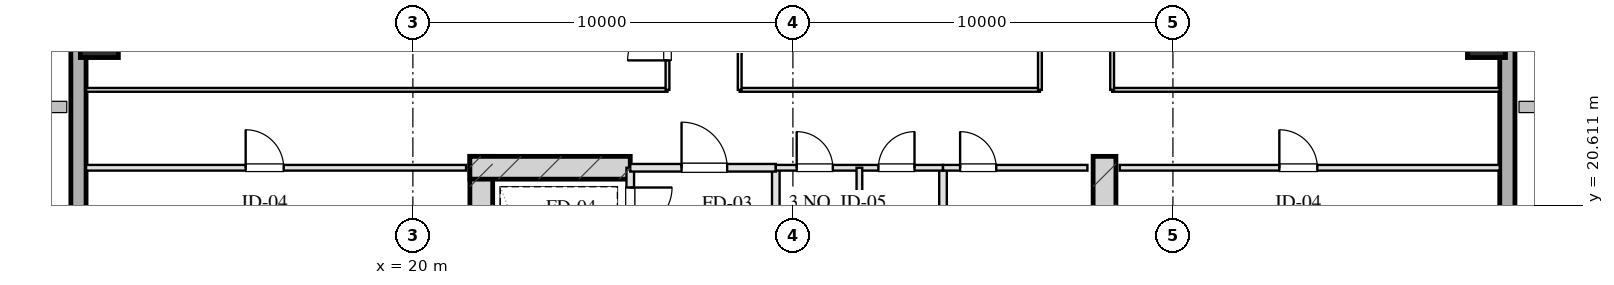
"""IFC4 building model, lengths in metres.
Left out: names, types, materials, properties, quantities, classifications, styles, units other than length and angle.
Written with IfcOpenShell. Run it as: python <this file> out.ifc"""

import sys

from ifc_helpers import new_model, si_unit, direction, frame, frame_2d, origin, origin_2d, place, context, subcontext, project, spatial, rectangle, hollow_rectangle, extrude, element, fill, save


model = new_model("IFC4")
c1 = context("Model", 3, precision=1e-05, world=origin(), true_north=direction((0.0, 1.0)))
c2 = subcontext(c1, "Body", "Model", "MODEL_VIEW")
j1 = project(units=[si_unit("LENGTHUNIT", "METRE"), si_unit("PLANEANGLEUNIT", "RADIAN")], contexts=[c1])
p1 = place(None, origin())
s1 = spatial("IfcSite", under=j1, at=p1, CompositionType="ELEMENT")
p2 = place(p1, origin())
s2 = spatial("IfcBuilding", under=s1, at=p2, CompositionType="ELEMENT")
p3 = place(p2, frame((0.0, 0.0, 110.4)))
s3 = spatial("IfcBuildingStorey", under=s2, at=p3, CompositionType="ELEMENT", Elevation=110.4)
for number, where, z_axis, x_axis in (
    (1, (21.8, 21.9, 0.0), (0.0, 0.0, 1.0), (0.0, -1.0, 0.0)),
    (2, (38.2, 21.9, 0.0), (0.0, 0.0, 1.0), (0.0, -1.0, 0.0)),
):
    element("IfcWall", number, at=place(p3, frame(where, z_axis=z_axis, x_axis=x_axis)), inside=s3, PredefinedType="SHEAR", context=c2, shape_type="SweptSolid", body=[
        extrude(rectangle(XDim=9.48, YDim=0.6, at=frame_2d((4.74, 0.0))), origin(), (0.0, 0.0, 1.0), 3.45),
    ])
p4 = place(p3, frame((21.5, 21.6, 0.0), z_axis=(0.0, 0.0, 1.0), x_axis=(1.0, 0.0, 0.0)))
e3 = element("IfcWall", 3, at=p4, inside=s3, PredefinedType="SHEAR", context=c2, shape_type="SweptSolid", body=[
    extrude(rectangle(XDim=4.22, YDim=0.6, at=frame_2d((2.11, 0.0))), origin(), (0.0, 0.0, 1.0), 3.45),
])
for number, where, z_axis, x_axis in (
    (4, (11.75, 25.0, 0.0), (0.0, 0.0, 1.0), (1.0, 0.0, 0.0)),
    (5, (48.25, 25.0, 0.0), (0.0, 0.0, 1.0), (1.0, 0.0, 0.0)),
):
    element("IfcColumn", number, at=place(p3, frame(where, z_axis=z_axis, x_axis=x_axis)), inside=s3, PredefinedType="COLUMN", context=c2, shape_type="SweptSolid", body=[
        extrude(hollow_rectangle(XDim=1.0, YDim=1.0, WallThickness=0.036, at=origin_2d()), origin(), (0.0, 0.0, 1.0), 3.451),
    ])
p5 = place(p3, frame((11.2, 9.0, 0.0), z_axis=(0.0, 0.0, 1.0), x_axis=(0.0, 1.0, 0.0)))
e6 = element("IfcWall", 6, at=p5, inside=s3, PredefinedType="SOLIDWALL", context=c2, shape_type="SweptSolid", body=[
    extrude(rectangle(XDim=50.0, YDim=0.4, at=frame_2d((25.0, 0.0))), origin(), (0.0, 0.0, 1.0), 2.61),
])
p6 = place(p5, frame((26.4, 0.0, 0.75)))
e7 = element("IfcOpeningElement", 7, at=p6, cuts=e6, PredefinedType="OPENING", context=c2, shape_type="SweptSolid", body=[
    extrude(rectangle(XDim=2.4, YDim=1.46, at=frame_2d((1.2, 0.73))), frame((0.0, 0.21, 0.0), z_axis=(0.0, -1.0, 0.0), x_axis=(1.0, 0.0, 0.0)), (0.0, 0.0, 1.0), 0.42),
])
p7 = place(p5, frame((18.65, 0.0, 0.0)))
e8 = element("IfcOpeningElement", 8, at=p7, cuts=e6, PredefinedType="OPENING", context=c2, shape_type="SweptSolid", body=[
    extrude(rectangle(XDim=1.1, YDim=2.15, at=frame_2d((0.55, 1.075))), frame((0.0, 0.21, 0.0), z_axis=(0.0, -1.0, 0.0), x_axis=(1.0, 0.0, 0.0)), (0.0, 0.0, 1.0), 0.42),
])
p8 = place(p3, frame((48.8, 59.0, 0.0), z_axis=(0.0, 0.0, 1.0), x_axis=(0.0, -1.0, 0.0)))
e9 = element("IfcWall", 9, at=p8, inside=s3, PredefinedType="SOLIDWALL", context=c2, shape_type="SweptSolid", body=[
    extrude(rectangle(XDim=50.0, YDim=0.4, at=frame_2d((25.0, 0.0))), origin(), (0.0, 0.0, 1.0), 2.61),
])
p9 = place(p8, frame((17.4, 0.0, 0.75)))
e10 = element("IfcOpeningElement", 10, at=p9, cuts=e9, PredefinedType="OPENING", context=c2, shape_type="SweptSolid", body=[
    extrude(rectangle(XDim=2.4, YDim=1.46, at=frame_2d((1.2, 0.73))), frame((0.0, 0.21, 0.0), z_axis=(0.0, -1.0, 0.0), x_axis=(1.0, 0.0, 0.0)), (0.0, 0.0, 1.0), 0.42),
])
p10 = place(p8, frame((30.226, 0.0, 0.0)))
e11 = element("IfcOpeningElement", 11, at=p10, cuts=e9, PredefinedType="OPENING", context=c2, shape_type="SweptSolid", body=[
    extrude(rectangle(XDim=1.1, YDim=2.15, at=frame_2d((0.55, 1.075))), frame((0.0, 0.21, 0.0), z_axis=(0.0, -1.0, 0.0), x_axis=(1.0, 0.0, 0.0)), (0.0, 0.0, 1.0), 0.42),
])
p11 = place(p3, frame((25.72, 21.6, 0.0), z_axis=(0.0, 0.0, 1.0), x_axis=(0.0, -1.0, 0.0)))
e12 = element("IfcWall", 12, at=p11, inside=s3, PredefinedType="PARTITIONING", context=c2, shape_type="SweptSolid", body=[
    extrude(rectangle(XDim=1.9, YDim=0.2, at=frame_2d((0.95, 0.0))), origin(), (0.0, 0.0, 1.0), 3.175),
])
p12 = place(p11, frame((0.52, 0.0, 0.0)))
e13 = element("IfcOpeningElement", 13, at=p12, cuts=e12, PredefinedType="OPENING", context=c2, shape_type="SweptSolid", body=[
    extrude(rectangle(XDim=1.1, YDim=2.05, at=frame_2d((0.55, 1.025))), frame((0.0, 0.11, 0.0), z_axis=(0.0, -1.0, 0.0), x_axis=(1.0, 0.0, 0.0)), (0.0, 0.0, 1.0), 0.22),
])
p13 = place(p3, frame((29.55, 21.6, 0.0), z_axis=(0.0, 0.0, 1.0), x_axis=(0.0, -1.0, 0.0)))
e14 = element("IfcWall", 14, at=p13, inside=s3, PredefinedType="PARTITIONING", context=c2, shape_type="SweptSolid", body=[
    extrude(rectangle(XDim=8.43, YDim=0.2, at=frame_2d((4.215, 0.0))), origin(), (0.0, 0.0, 1.0), 3.175),
])
p14 = place(p3, frame((25.72, 21.6, 0.0), z_axis=(0.0, 0.0, 1.0), x_axis=(1.0, 0.0, 0.0)))
e15 = element("IfcWall", 15, at=p14, inside=s3, PredefinedType="PARTITIONING", context=c2, shape_type="SweptSolid", body=[
    extrude(rectangle(XDim=3.83, YDim=0.2, at=frame_2d((1.915, 0.0))), origin(), (0.0, 0.0, 1.0), 3.175),
])
p15 = place(p14, frame((1.35, 0.0, 0.0)))
e16 = element("IfcOpeningElement", 16, at=p15, cuts=e15, PredefinedType="OPENING", context=c2, shape_type="SweptSolid", body=[
    extrude(rectangle(XDim=1.2, YDim=2.05, at=frame_2d((0.6, 1.025))), frame((0.0, 0.11, 0.0), z_axis=(0.0, -1.0, 0.0), x_axis=(1.0, 0.0, 0.0)), (0.0, 0.0, 1.0), 0.22),
])
p16 = place(p3, frame((33.95, 21.6, 0.0), z_axis=(0.0, 0.0, 1.0), x_axis=(0.0, -1.0, 0.0)))
e17 = element("IfcWall", 17, at=p16, inside=s3, PredefinedType="PARTITIONING", context=c2, shape_type="SweptSolid", body=[
    extrude(rectangle(XDim=8.43, YDim=0.2, at=frame_2d((4.215, 0.0))), origin(), (0.0, 0.0, 1.0), 3.175),
])
p17 = place(p3, frame((29.55, 21.6, 0.0), z_axis=(0.0, 0.0, 1.0), x_axis=(1.0, 0.0, 0.0)))
e18 = element("IfcWall", 18, at=p17, inside=s3, PredefinedType="PARTITIONING", context=c2, shape_type="SweptSolid", body=[
    extrude(rectangle(XDim=4.4, YDim=0.15, at=frame_2d((2.2, 0.0))), origin(), (0.0, 0.0, 1.0), 3.175),
])
p18 = place(p17, frame((0.55, 0.0, 0.0)))
e19 = element("IfcOpeningElement", 19, at=p18, cuts=e18, PredefinedType="OPENING", context=c2, shape_type="SweptSolid", body=[
    extrude(rectangle(XDim=0.95, YDim=2.05, at=frame_2d((0.475, 1.025))), frame((0.0, 0.085, 0.0), z_axis=(0.0, -1.0, 0.0), x_axis=(1.0, 0.0, 0.0)), (0.0, 0.0, 1.0), 0.17),
])
p19 = place(p17, frame((2.7, 0.0, 0.0)))
e20 = element("IfcOpeningElement", 20, at=p19, cuts=e18, PredefinedType="OPENING", context=c2, shape_type="SweptSolid", body=[
    extrude(rectangle(XDim=0.95, YDim=2.05, at=frame_2d((0.475, 1.025))), frame((0.0, 0.085, 0.0), z_axis=(0.0, -1.0, 0.0), x_axis=(1.0, 0.0, 0.0)), (0.0, 0.0, 1.0), 0.17),
])
p20 = place(p3, frame((31.75, 21.6, 0.0), z_axis=(0.0, 0.0, 1.0), x_axis=(0.0, -1.0, 0.0)))
e21 = element("IfcWall", 21, at=p20, inside=s3, PredefinedType="PARTITIONING", context=c2, shape_type="SweptSolid", body=[
    extrude(rectangle(XDim=8.43, YDim=0.15, at=frame_2d((4.215, 0.0))), origin(), (0.0, 0.0, 1.0), 3.175),
])
p21 = place(p3, frame((33.95, 21.6, 0.0), z_axis=(0.0, 0.0, 1.0), x_axis=(1.0, 0.0, 0.0)))
e22 = element("IfcWall", 22, at=p21, inside=s3, PredefinedType="PARTITIONING", context=c2, shape_type="SweptSolid", body=[
    extrude(rectangle(XDim=3.8, YDim=0.15, at=frame_2d((1.9, 0.0))), origin(), (0.0, 0.0, 1.0), 3.175),
])
p22 = place(p21, frame((0.45, 0.0, 0.0)))
e23 = element("IfcOpeningElement", 23, at=p22, cuts=e22, PredefinedType="OPENING", context=c2, shape_type="SweptSolid", body=[
    extrude(rectangle(XDim=0.95, YDim=2.05, at=frame_2d((0.475, 1.025))), frame((0.0, 0.085, 0.0), z_axis=(0.0, -1.0, 0.0), x_axis=(1.0, 0.0, 0.0)), (0.0, 0.0, 1.0), 0.17),
])
p23 = place(p3, frame((11.4, 21.6, 0.0), z_axis=(0.0, 0.0, 1.0), x_axis=(1.0, 0.0, 0.0)))
e24 = element("IfcWall", 24, at=p23, inside=s3, PredefinedType="PARTITIONING", context=c2, shape_type="SweptSolid", body=[
    extrude(rectangle(XDim=10.0, YDim=0.15, at=frame_2d((5.0, 0.0))), origin(), (0.0, 0.0, 1.0), 3.175),
])
p24 = place(p23, frame((4.2, 0.0, 0.0)))
e25 = element("IfcOpeningElement", 25, at=p24, cuts=e24, PredefinedType="OPENING", context=c2, shape_type="SweptSolid", body=[
    extrude(rectangle(XDim=1.0, YDim=2.05, at=frame_2d((0.5, 1.025))), frame((0.0, 0.085, 0.0), z_axis=(0.0, -1.0, 0.0), x_axis=(1.0, 0.0, 0.0)), (0.0, 0.0, 1.0), 0.17),
])
p25 = place(p3, frame((38.6, 21.6, 0.0), z_axis=(0.0, 0.0, 1.0), x_axis=(1.0, 0.0, 0.0)))
e26 = element("IfcWall", 26, at=p25, inside=s3, PredefinedType="PARTITIONING", context=c2, shape_type="SweptSolid", body=[
    extrude(rectangle(XDim=10.0, YDim=0.15, at=frame_2d((5.0, 0.0))), origin(), (0.0, 0.0, 1.0), 3.175),
])
p26 = place(p25, frame((4.2, 0.0, 0.0)))
e27 = element("IfcOpeningElement", 27, at=p26, cuts=e26, PredefinedType="OPENING", context=c2, shape_type="SweptSolid", body=[
    extrude(rectangle(XDim=1.0, YDim=2.05, at=frame_2d((0.5, 1.025))), frame((0.0, 0.085, 0.0), z_axis=(0.0, -1.0, 0.0), x_axis=(1.0, 0.0, 0.0)), (0.0, 0.0, 1.0), 0.17),
])
p27 = place(p3, frame((11.4, 23.65, 0.0), z_axis=(0.0, 0.0, 1.0), x_axis=(1.0, 0.0, 0.0)))
e28 = element("IfcWall", 28, at=p27, inside=s3, PredefinedType="MOVABLE", context=c2, shape_type="SweptSolid", body=[
    extrude(rectangle(XDim=15.3, YDim=0.1, at=frame_2d((7.65, 0.0))), origin(), (0.0, 0.0, 1.0), 3.175),
])
p28 = place(p3, frame((28.6, 23.65, 0.0), z_axis=(0.0, 0.0, 1.0), x_axis=(1.0, 0.0, 0.0)))
e29 = element("IfcWall", 29, at=p28, inside=s3, PredefinedType="MOVABLE", context=c2, shape_type="SweptSolid", body=[
    extrude(rectangle(XDim=7.9, YDim=0.1, at=frame_2d((3.95, 0.0))), origin(), (0.0, 0.0, 1.0), 3.175),
])
p29 = place(p3, frame((38.4, 23.65, 0.0), z_axis=(0.0, 0.0, 1.0), x_axis=(1.0, 0.0, 0.0)))
e30 = element("IfcWall", 30, at=p29, inside=s3, PredefinedType="MOVABLE", context=c2, shape_type="SweptSolid", body=[
    extrude(rectangle(XDim=10.2, YDim=0.1, at=frame_2d((5.1, 0.0))), origin(), (0.0, 0.0, 1.0), 3.175),
])
p30 = place(p3, frame((26.7, 23.65, 0.0), z_axis=(0.0, 0.0, 1.0), x_axis=(0.0, 1.0, 0.0)))
e31 = element("IfcWall", 31, at=p30, inside=s3, PredefinedType="MOVABLE", context=c2, shape_type="SweptSolid", body=[
    extrude(rectangle(XDim=20.7, YDim=0.1, at=frame_2d((10.35, 0.0))), origin(), (0.0, 0.0, 1.0), 3.175),
])
p31 = place(p30, frame((0.775, 0.0, 0.0)))
e32 = element("IfcOpeningElement", 32, at=p31, cuts=e31, PredefinedType="OPENING", context=c2, shape_type="SweptSolid", body=[
    extrude(rectangle(XDim=1.05, YDim=2.05, at=frame_2d((0.525, 1.025))), frame((0.0, 0.06, 0.0), z_axis=(0.0, -1.0, 0.0), x_axis=(1.0, 0.0, 0.0)), (0.0, 0.0, 1.0), 0.12),
])
p32 = place(p30, frame((3.95, 0.0, 0.0)))
e33 = element("IfcOpeningElement", 33, at=p32, cuts=e31, PredefinedType="OPENING", context=c2, shape_type="SweptSolid", body=[
    extrude(rectangle(XDim=0.85, YDim=2.05, at=frame_2d((0.425, 1.025))), frame((0.0, 0.06, 0.0), z_axis=(0.0, -1.0, 0.0), x_axis=(1.0, 0.0, 0.0)), (0.0, 0.0, 1.0), 0.12),
])
p33 = place(p30, frame((8.273, 0.0, 0.0)))
e34 = element("IfcOpeningElement", 34, at=p33, cuts=e31, PredefinedType="OPENING", context=c2, shape_type="SweptSolid", body=[
    extrude(rectangle(XDim=1.0, YDim=2.05, at=frame_2d((0.5, 1.025))), frame((0.0, 0.06, 0.0), z_axis=(0.0, -1.0, 0.0), x_axis=(1.0, 0.0, 0.0)), (0.0, 0.0, 1.0), 0.12),
])
p34 = place(p30, frame((12.559, 0.0, 0.0)))
e35 = element("IfcOpeningElement", 35, at=p34, cuts=e31, PredefinedType="OPENING", context=c2, shape_type="SweptSolid", body=[
    extrude(rectangle(XDim=1.0, YDim=2.05, at=frame_2d((0.5, 1.025))), frame((0.0, 0.06, 0.0), z_axis=(0.0, -1.0, 0.0), x_axis=(1.0, 0.0, 0.0)), (0.0, 0.0, 1.0), 0.12),
])
p35 = place(p30, frame((16.078, 0.0, 0.0)))
e36 = element("IfcOpeningElement", 36, at=p35, cuts=e31, PredefinedType="OPENING", context=c2, shape_type="SweptSolid", body=[
    extrude(rectangle(XDim=1.0, YDim=2.05, at=frame_2d((0.5, 1.025))), frame((0.0, 0.06, 0.0), z_axis=(0.0, -1.0, 0.0), x_axis=(1.0, 0.0, 0.0)), (0.0, 0.0, 1.0), 0.12),
])
p36 = place(p30, frame((18.967, 0.0, 0.0)))
e37 = element("IfcOpeningElement", 37, at=p36, cuts=e31, PredefinedType="OPENING", context=c2, shape_type="SweptSolid", body=[
    extrude(rectangle(XDim=1.0, YDim=2.05, at=frame_2d((0.5, 1.025))), frame((0.0, 0.06, 0.0), z_axis=(0.0, -1.0, 0.0), x_axis=(1.0, 0.0, 0.0)), (0.0, 0.0, 1.0), 0.12),
])
p37 = place(p3, frame((28.6, 23.65, 0.0), z_axis=(0.0, 0.0, 1.0), x_axis=(0.0, 1.0, 0.0)))
e38 = element("IfcWall", 38, at=p37, inside=s3, PredefinedType="MOVABLE", context=c2, shape_type="SweptSolid", body=[
    extrude(rectangle(XDim=20.7, YDim=0.1, at=frame_2d((10.35, 0.0))), origin(), (0.0, 0.0, 1.0), 3.175),
])
p38 = place(p37, frame((5.198, 0.0, 0.0)))
e39 = element("IfcOpeningElement", 39, at=p38, cuts=e38, PredefinedType="OPENING", context=c2, shape_type="SweptSolid", body=[
    extrude(rectangle(XDim=1.1, YDim=2.05, at=frame_2d((0.55, 1.025))), frame((0.0, 0.06, 0.0), z_axis=(0.0, -1.0, 0.0), x_axis=(1.0, 0.0, 0.0)), (0.0, 0.0, 1.0), 0.12),
])
p39 = place(p37, frame((15.667, 0.0, 0.0)))
e40 = element("IfcOpeningElement", 40, at=p39, cuts=e38, PredefinedType="OPENING", context=c2, shape_type="SweptSolid", body=[
    extrude(rectangle(XDim=1.1, YDim=2.05, at=frame_2d((0.55, 1.025))), frame((0.0, 0.06, 0.0), z_axis=(0.0, -1.0, 0.0), x_axis=(1.0, 0.0, 0.0)), (0.0, 0.0, 1.0), 0.12),
])
p40 = place(p3, frame((36.5, 23.65, 0.0), z_axis=(0.0, 0.0, 1.0), x_axis=(0.0, 1.0, 0.0)))
e41 = element("IfcWall", 41, at=p40, inside=s3, PredefinedType="MOVABLE", context=c2, shape_type="SweptSolid", body=[
    extrude(rectangle(XDim=20.7, YDim=0.1, at=frame_2d((10.35, 0.0))), origin(), (0.0, 0.0, 1.0), 3.175),
])
p41 = place(p3, frame((38.4, 23.65, 0.0), z_axis=(0.0, 0.0, 1.0), x_axis=(0.0, 1.0, 0.0)))
e42 = element("IfcWall", 42, at=p41, inside=s3, PredefinedType="MOVABLE", context=c2, shape_type="SweptSolid", body=[
    extrude(rectangle(XDim=20.7, YDim=0.1, at=frame_2d((10.35, 0.0))), origin(), (0.0, 0.0, 1.0), 3.175),
])
p42 = place(p41, frame((2.699, 0.0, 0.0)))
e43 = element("IfcOpeningElement", 43, at=p42, cuts=e42, PredefinedType="OPENING", context=c2, shape_type="SweptSolid", body=[
    extrude(rectangle(XDim=1.0, YDim=2.05, at=frame_2d((0.5, 1.025))), frame((0.0, 0.06, 0.0), z_axis=(0.0, -1.0, 0.0), x_axis=(1.0, 0.0, 0.0)), (0.0, 0.0, 1.0), 0.12),
])
p43 = place(p41, frame((9.875, 0.0, 0.0)))
e44 = element("IfcOpeningElement", 44, at=p43, cuts=e42, PredefinedType="OPENING", context=c2, shape_type="SweptSolid", body=[
    extrude(rectangle(XDim=1.0, YDim=2.05, at=frame_2d((0.5, 1.025))), frame((0.0, 0.06, 0.0), z_axis=(0.0, -1.0, 0.0), x_axis=(1.0, 0.0, 0.0)), (0.0, 0.0, 1.0), 0.12),
])
p44 = place(p41, frame((17.025, 0.0, 0.0)))
e45 = element("IfcOpeningElement", 45, at=p44, cuts=e42, PredefinedType="OPENING", context=c2, shape_type="SweptSolid", body=[
    extrude(rectangle(XDim=1.0, YDim=2.05, at=frame_2d((0.5, 1.025))), frame((0.0, 0.06, 0.0), z_axis=(0.0, -1.0, 0.0), x_axis=(1.0, 0.0, 0.0)), (0.0, 0.0, 1.0), 0.12),
])
p45 = place(p12, origin())
e46 = element("IfcDoor", 46, at=p45, inside=s3, OperationType="SINGLE_SWING_LEFT", PredefinedType="DOOR", context=c2, shape_type="SweptSolid", body=[
    extrude(rectangle(XDim=1.1, YDim=2.05, at=frame_2d((0.55, 1.025))), frame((0.0, 0.025, 0.0), z_axis=(0.0, -1.0, 0.0), x_axis=(1.0, 0.0, 0.0)), (0.0, 0.0, 1.0), 0.05),
])
fill(e13, e46)
p46 = place(p15, origin())
e47 = element("IfcDoor", 47, at=p46, inside=s3, OperationType="SINGLE_SWING_LEFT", PredefinedType="DOOR", context=c2, shape_type="SweptSolid", body=[
    extrude(rectangle(XDim=1.2, YDim=2.05, at=frame_2d((0.6, 1.025))), frame((0.0, 0.025, 0.0), z_axis=(0.0, -1.0, 0.0), x_axis=(1.0, 0.0, 0.0)), (0.0, 0.0, 1.0), 0.05),
])
fill(e16, e47)
p47 = place(p18, origin())
e48 = element("IfcDoor", 48, at=p47, inside=s3, OperationType="SINGLE_SWING_LEFT", PredefinedType="DOOR", context=c2, shape_type="SweptSolid", body=[
    extrude(rectangle(XDim=0.95, YDim=2.05, at=frame_2d((0.475, 1.025))), frame((0.0, 0.025, 0.0), z_axis=(0.0, -1.0, 0.0), x_axis=(1.0, 0.0, 0.0)), (0.0, 0.0, 1.0), 0.05),
])
fill(e19, e48)
p48 = place(p19, origin())
e49 = element("IfcDoor", 49, at=p48, inside=s3, OperationType="SINGLE_SWING_RIGHT", PredefinedType="DOOR", context=c2, shape_type="SweptSolid", body=[
    extrude(rectangle(XDim=0.95, YDim=2.05, at=frame_2d((0.475, 1.025))), frame((0.0, 0.025, 0.0), z_axis=(0.0, -1.0, 0.0), x_axis=(1.0, 0.0, 0.0)), (0.0, 0.0, 1.0), 0.05),
])
fill(e20, e49)
p49 = place(p22, origin())
e50 = element("IfcDoor", 50, at=p49, inside=s3, OperationType="SINGLE_SWING_LEFT", PredefinedType="DOOR", context=c2, shape_type="SweptSolid", body=[
    extrude(rectangle(XDim=0.95, YDim=2.05, at=frame_2d((0.475, 1.025))), frame((0.0, 0.025, 0.0), z_axis=(0.0, -1.0, 0.0), x_axis=(1.0, 0.0, 0.0)), (0.0, 0.0, 1.0), 0.05),
])
fill(e23, e50)
p50 = place(p24, origin())
e51 = element("IfcDoor", 51, at=p50, inside=s3, OperationType="SINGLE_SWING_LEFT", PredefinedType="DOOR", context=c2, shape_type="SweptSolid", body=[
    extrude(rectangle(XDim=1.0, YDim=2.05, at=frame_2d((0.5, 1.025))), frame((0.0, 0.025, 0.0), z_axis=(0.0, -1.0, 0.0), x_axis=(1.0, 0.0, 0.0)), (0.0, 0.0, 1.0), 0.05),
])
fill(e25, e51)
p51 = place(p26, origin())
e52 = element("IfcDoor", 52, at=p51, inside=s3, OperationType="SINGLE_SWING_LEFT", PredefinedType="DOOR", context=c2, shape_type="SweptSolid", body=[
    extrude(rectangle(XDim=1.0, YDim=2.05, at=frame_2d((0.5, 1.025))), frame((0.0, 0.025, 0.0), z_axis=(0.0, -1.0, 0.0), x_axis=(1.0, 0.0, 0.0)), (0.0, 0.0, 1.0), 0.05),
])
fill(e27, e52)
p52 = place(p31, origin())
e53 = element("IfcDoor", 53, at=p52, inside=s3, OperationType="SINGLE_SWING_LEFT", PredefinedType="DOOR", context=c2, shape_type="SweptSolid", body=[
    extrude(rectangle(XDim=1.05, YDim=2.05, at=frame_2d((0.525, 1.025))), frame((0.0, 0.025, 0.0), z_axis=(0.0, -1.0, 0.0), x_axis=(1.0, 0.0, 0.0)), (0.0, 0.0, 1.0), 0.05),
])
fill(e32, e53)
save(model, sys.argv[1])
